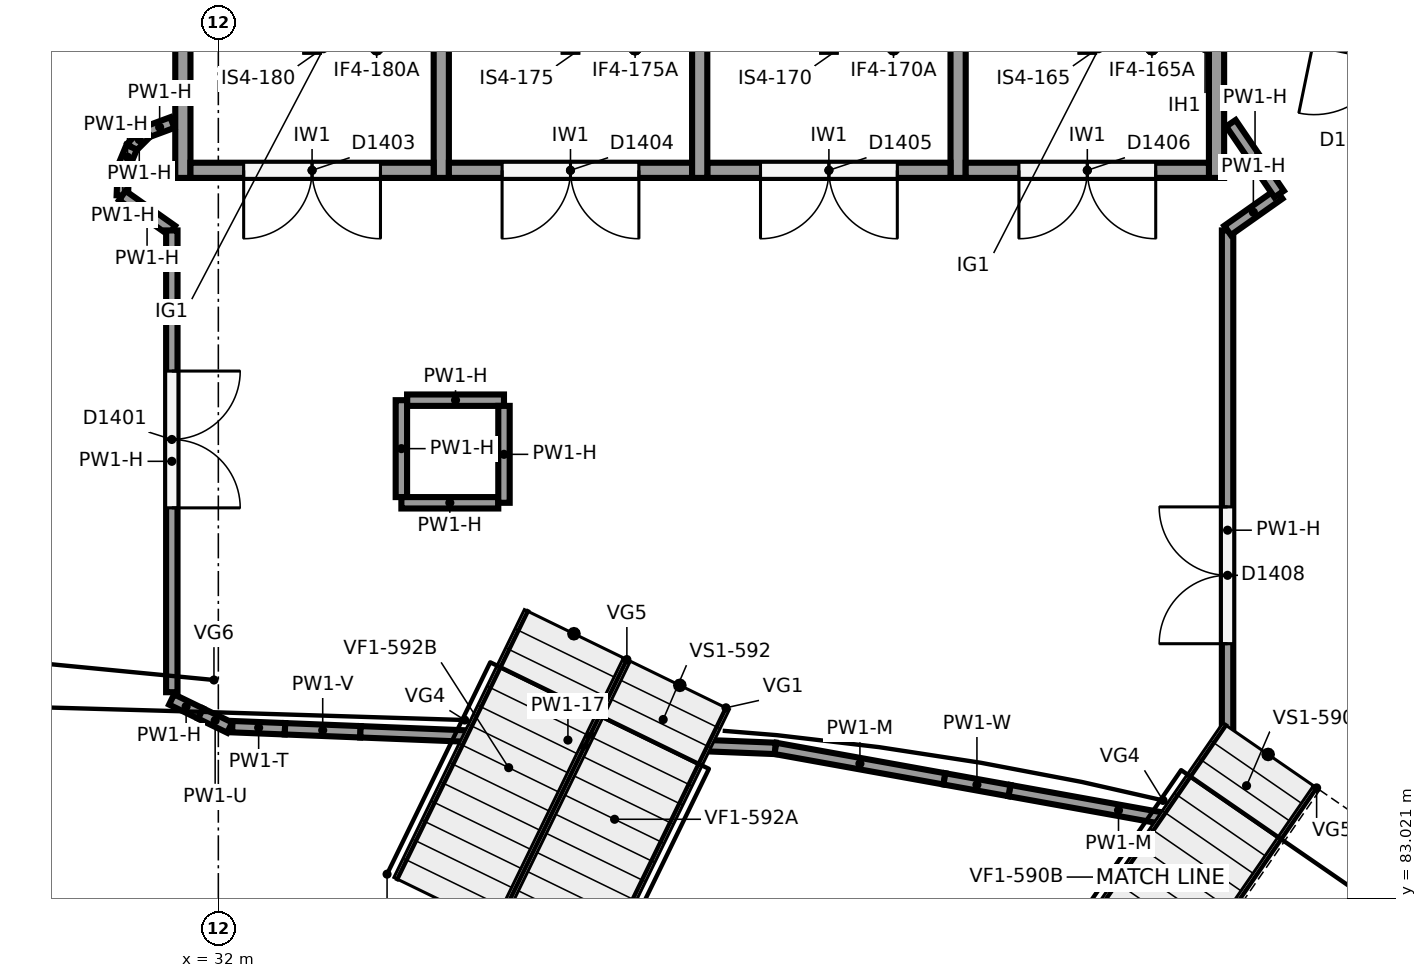
"""IFC4 building model, lengths in metres.
Left out: names, types, materials, properties, quantities, classifications, styles, units other than length and angle.
Written with IfcOpenShell. Run it as: python <this file> out.ifc"""

import sys

from ifc_helpers import new_model, si_unit, direction, frame, frame_2d, origin, origin_2d, place, context, subcontext, project, spatial, rectangle, circle, extrude, element, fill, save


model = new_model("IFC4")
c1 = context("Model", 3, precision=1e-05, world=origin(), true_north=direction((0.0, 1.0)))
c2 = subcontext(c1, "Body", "Model", "MODEL_VIEW")
j1 = project(units=[si_unit("LENGTHUNIT", "METRE"), si_unit("PLANEANGLEUNIT", "RADIAN")], contexts=[c1])
p1 = place(None, origin())
s1 = spatial("IfcSite", under=j1, at=p1, CompositionType="ELEMENT")
p2 = place(p1, origin())
s2 = spatial("IfcBuilding", under=s1, at=p2, CompositionType="ELEMENT")
p3 = place(p2, frame((0.0, 0.0, 18.0)))
s3 = spatial("IfcBuildingStorey", under=s2, at=p3, CompositionType="ELEMENT", Elevation=18.0)
p4 = place(p3, frame((42.016, 84.707, 0.0), z_axis=(0.0, 0.0, 1.0), x_axis=(1.0, 0.0, 0.0)))
e1 = element("IfcColumn", 1, at=p4, inside=s3, PredefinedType="COLUMN", context=c2, shape_type="SweptSolid", body=[
    extrude(circle(Radius=0.4, at=origin_2d()), origin(), (0.0, 0.0, 1.0), 4.807),
])
p5 = place(p3, frame((46.333, 90.126, 0.0), z_axis=(0.0, 0.0, 1.0), x_axis=(1.0, 0.0, 0.0)))
e2 = element("IfcColumn", 2, at=p5, inside=s3, PredefinedType="COLUMN", context=c2, shape_type="SweptSolid", body=[
    extrude(circle(Radius=0.45, at=origin_2d()), origin(), (0.0, 0.0, 1.0), 6.0),
])
p6 = place(p3, frame((31.737, 85.377, 0.0), z_axis=(0.0, 0.0, 1.0), x_axis=(1.0, 0.0, 0.0)))
e3 = element("IfcColumn", 3, at=p6, inside=s3, PredefinedType="COLUMN", context=c2, shape_type="SweptSolid", body=[
    extrude(circle(Radius=0.4, at=origin_2d()), origin(), (0.0, 0.0, 1.0), 4.687),
])
p7 = place(p3, frame((32.944, 90.551, 0.0), z_axis=(0.0, 0.0, 1.0), x_axis=(1.0, 0.0, 0.0)))
e4 = element("IfcColumn", 4, at=p7, inside=s3, PredefinedType="COLUMN", context=c2, shape_type="SweptSolid", body=[
    extrude(circle(Radius=0.55, at=origin_2d()), origin(), (0.0, 0.0, 1.0), 6.0),
])
for number, where, z_axis, x_axis in (
    (5, (45.133, 101.6, 0.0), (0.0, 0.0, 1.0), (0.0, -1.0, 0.0)),
    (6, (38.333, 101.6, 0.0), (0.0, 0.0, 1.0), (0.0, -1.0, 0.0)),
    (7, (31.533, 101.6, 0.0), (0.0, 0.0, 1.0), (0.0, -1.0, 0.0)),
    (8, (41.733, 101.6, 0.0), (0.0, 0.0, 1.0), (0.0, -1.0, 0.0)),
    (9, (34.933, 101.6, 0.0), (0.0, 0.0, 1.0), (0.0, -1.0, 0.0)),
):
    element("IfcWall", number, at=place(p3, frame(where, z_axis=z_axis, x_axis=x_axis)), inside=s3, PredefinedType="SHEAR", context=c2, shape_type="SweptSolid", body=[
        extrude(rectangle(XDim=9.1, YDim=0.2, at=frame_2d((4.55, 0.0))), origin(), (0.0, 0.0, 1.0), 5.6),
    ])
p8 = place(p3, frame((45.033, 92.6, 0.0), z_axis=(0.0, 0.0, 1.0), x_axis=(-1.0, 0.0, 0.0)))
e10 = element("IfcWall", 10, at=p8, inside=s3, PredefinedType="SHEAR", context=c2, shape_type="SweptSolid", body=[
    extrude(rectangle(XDim=3.2, YDim=0.2, at=frame_2d((1.6, 0.0))), origin(), (0.0, 0.0, 1.0), 5.6),
])
p9 = place(p8, frame((0.7, 0.0, 0.0)))
e11 = element("IfcOpeningElement", 11, at=p9, cuts=e10, PredefinedType="OPENING", context=c2, shape_type="SweptSolid", body=[
    extrude(rectangle(XDim=1.8, YDim=2.1, at=frame_2d((0.9, 1.05))), frame((0.0, 0.11, 0.0), z_axis=(0.0, -1.0, 0.0), x_axis=(1.0, 0.0, 0.0)), (0.0, 0.0, 1.0), 0.22),
])
p10 = place(p3, frame((41.633, 92.6, 0.0), z_axis=(0.0, 0.0, 1.0), x_axis=(-1.0, 0.0, 0.0)))
e12 = element("IfcWall", 12, at=p10, inside=s3, PredefinedType="SHEAR", context=c2, shape_type="SweptSolid", body=[
    extrude(rectangle(XDim=3.2, YDim=0.2, at=frame_2d((1.6, 0.0))), origin(), (0.0, 0.0, 1.0), 5.6),
])
p11 = place(p10, frame((0.7, 0.0, 0.0)))
e13 = element("IfcOpeningElement", 13, at=p11, cuts=e12, PredefinedType="OPENING", context=c2, shape_type="SweptSolid", body=[
    extrude(rectangle(XDim=1.8, YDim=2.1, at=frame_2d((0.9, 1.05))), frame((0.0, 0.11, 0.0), z_axis=(0.0, -1.0, 0.0), x_axis=(1.0, 0.0, 0.0)), (0.0, 0.0, 1.0), 0.22),
])
p12 = place(p3, frame((38.233, 92.6, 0.0), z_axis=(0.0, 0.0, 1.0), x_axis=(-1.0, 0.0, 0.0)))
e14 = element("IfcWall", 14, at=p12, inside=s3, PredefinedType="SHEAR", context=c2, shape_type="SweptSolid", body=[
    extrude(rectangle(XDim=3.2, YDim=0.2, at=frame_2d((1.6, 0.0))), origin(), (0.0, 0.0, 1.0), 5.6),
])
p13 = place(p12, frame((0.7, 0.0, 0.0)))
e15 = element("IfcOpeningElement", 15, at=p13, cuts=e14, PredefinedType="OPENING", context=c2, shape_type="SweptSolid", body=[
    extrude(rectangle(XDim=1.8, YDim=2.1, at=frame_2d((0.9, 1.05))), frame((0.0, 0.11, 0.0), z_axis=(0.0, -1.0, 0.0), x_axis=(1.0, 0.0, 0.0)), (0.0, 0.0, 1.0), 0.22),
])
p14 = place(p3, frame((34.833, 92.6, 0.0), z_axis=(0.0, 0.0, 1.0), x_axis=(-1.0, 0.0, 0.0)))
e16 = element("IfcWall", 16, at=p14, inside=s3, PredefinedType="SHEAR", context=c2, shape_type="SweptSolid", body=[
    extrude(rectangle(XDim=3.2, YDim=0.2, at=frame_2d((1.6, 0.0))), origin(), (0.0, 0.0, 1.0), 5.6),
])
p15 = place(p14, frame((0.7, 0.0, 0.0)))
e17 = element("IfcOpeningElement", 17, at=p15, cuts=e16, PredefinedType="OPENING", context=c2, shape_type="SweptSolid", body=[
    extrude(rectangle(XDim=1.8, YDim=2.1, at=frame_2d((0.9, 1.05))), frame((0.0, 0.11, 0.0), z_axis=(0.0, -1.0, 0.0), x_axis=(1.0, 0.0, 0.0)), (0.0, 0.0, 1.0), 0.22),
])
p16 = place(p3, frame((35.758, 89.576, 0.0), z_axis=(0.0, 0.0, 1.0), x_axis=(-1.0, 0.0, 0.0)))
e18 = element("IfcWall", 18, at=p16, inside=s3, PredefinedType="PARTITIONING", context=c2, shape_type="SweptSolid", body=[
    extrude(rectangle(XDim=1.275, YDim=0.15, at=frame_2d((0.637, 0.0))), origin(), (0.0, 0.0, 1.0), 2.844),
])
for number, where, z_axis, x_axis in (
    (19, (34.408, 89.576, 0.0), (0.0, 0.0, 1.0), (0.0, -1.0, 0.0)),
    (20, (34.408, 88.226, 0.0), (0.0, 0.0, 1.0), (1.0, 0.0, 0.0)),
    (21, (35.758, 88.226, 0.0), (0.0, 0.0, 1.0), (0.0, 1.0, 0.0)),
):
    element("IfcWall", number, at=place(p3, frame(where, z_axis=z_axis, x_axis=x_axis)), inside=s3, PredefinedType="PARTITIONING", context=c2, shape_type="SweptSolid", body=[
        extrude(rectangle(XDim=1.275, YDim=0.15, at=frame_2d((0.638, 0.0))), origin(), (0.0, 0.0, 1.0), 2.844),
    ])
p17 = place(p3, frame((31.395, 93.229, 0.0), z_axis=(0.0, 0.0, 1.0), x_axis=(-0.937757023355, -0.347292045903, 0.0)))
e22 = element("IfcWall", 22, at=p17, inside=s3, PredefinedType="PARTITIONING", context=c2, shape_type="SweptSolid", body=[
    extrude(rectangle(XDim=0.356, YDim=0.15, at=frame_2d((0.178, 0.0))), origin(), (0.0, 0.0, 1.0), 2.844),
])
p18 = place(p3, frame((31.061, 93.105, 0.0), z_axis=(0.0, 0.0, 1.0), x_axis=(-0.707534941396, -0.706678361564, 0.0)))
e23 = element("IfcWall", 23, at=p18, inside=s3, PredefinedType="PARTITIONING", context=c2, shape_type="SweptSolid", body=[
    extrude(rectangle(XDim=0.285, YDim=0.15, at=frame_2d((0.143, 0.0))), origin(), (0.0, 0.0, 1.0), 2.844),
])
p19 = place(p3, frame((30.859, 92.904, 0.0), z_axis=(0.0, 0.0, 1.0), x_axis=(-0.382275228123, -0.924048510611, 0.0)))
e24 = element("IfcWall", 24, at=p19, inside=s3, PredefinedType="PARTITIONING", context=c2, shape_type="SweptSolid", body=[
    extrude(rectangle(XDim=0.282, YDim=0.15, at=frame_2d((0.141, 0.0))), origin(), (0.0, 0.0, 1.0), 2.844),
])
p20 = place(p3, frame((30.751, 92.643, 0.0), z_axis=(0.0, 0.0, 1.0), x_axis=(-0.039058121451, -0.999236940444, 0.0)))
e25 = element("IfcWall", 25, at=p20, inside=s3, PredefinedType="PARTITIONING", context=c2, shape_type="SweptSolid", body=[
    extrude(rectangle(XDim=0.375, YDim=0.15, at=frame_2d((0.188, 0.0))), origin(), (0.0, 0.0, 1.0), 2.844),
])
p21 = place(p3, frame((30.737, 92.269, 0.0), z_axis=(0.0, 0.0, 1.0), x_axis=(0.817400495506, -0.576069813431, 0.0)))
e26 = element("IfcWall", 26, at=p21, inside=s3, PredefinedType="PARTITIONING", context=c2, shape_type="SweptSolid", body=[
    extrude(rectangle(XDim=0.797, YDim=0.15, at=frame_2d((0.398, 0.0))), origin(), (0.0, 0.0, 1.0), 2.844),
])
p22 = place(p3, frame((31.388, 91.809, 0.0), z_axis=(0.0, 0.0, 1.0), x_axis=(-8.037293e-05, -0.99999999677, 0.0)))
e27 = element("IfcWall", 27, at=p22, inside=s3, PredefinedType="PARTITIONING", context=c2, shape_type="SweptSolid", body=[
    extrude(rectangle(XDim=6.075, YDim=0.15, at=frame_2d((3.038, 0.0))), origin(), (0.0, 0.0, 1.0), 2.844),
])
p23 = place(p22, frame((1.85, 0.0, 0.0)))
e28 = element("IfcOpeningElement", 28, at=p23, cuts=e27, PredefinedType="OPENING", context=c2, shape_type="SweptSolid", body=[
    extrude(rectangle(XDim=1.8, YDim=2.1, at=frame_2d((0.9, 1.05))), frame((0.0, 0.085, 0.0), z_axis=(0.0, -1.0, 0.0), x_axis=(1.0, 0.0, 0.0)), (0.0, 0.0, 1.0), 0.17),
])
p24 = place(p3, frame((32.184, 85.281, 0.0), z_axis=(0.0, 0.0, 1.0), x_axis=(0.999194762281, -0.040122649842, 0.0)))
e29 = element("IfcWall", 29, at=p24, inside=s3, PredefinedType="PARTITIONING", context=c2, shape_type="SweptSolid", body=[
    extrude(rectangle(XDim=0.694, YDim=0.15, at=frame_2d((0.347, 0.0))), origin(), (0.0, 0.0, 1.0), 2.257),
])
p25 = place(p3, frame((32.877, 85.253, 0.0), z_axis=(0.0, 0.0, 1.0), x_axis=(0.999197421749, -0.040056364915, 0.0)))
e30 = element("IfcWall", 30, at=p25, inside=s3, PredefinedType="PARTITIONING", context=c2, shape_type="SweptSolid", body=[
    extrude(rectangle(XDim=0.993, YDim=0.15, at=frame_2d((0.497, 0.0))), origin(), (0.0, 0.0, 1.0), 2.506),
])
p26 = place(p3, frame((33.87, 85.213, 0.0), z_axis=(0.0, 0.0, 1.0), x_axis=(0.999200173436, -0.039987665678, 0.0)))
e31 = element("IfcWall", 31, at=p26, inside=s3, PredefinedType="PARTITIONING", context=c2, shape_type="SweptSolid", body=[
    extrude(rectangle(XDim=5.464, YDim=0.15, at=frame_2d((2.732, 0.0))), origin(), (0.0, 0.0, 1.0), 2.756),
])
p27 = place(p3, frame((39.33, 84.995, 0.0), z_axis=(0.0, 0.0, 1.0), x_axis=(0.984135059847, -0.177420923174, 0.0)))
e32 = element("IfcWall", 32, at=p27, inside=s3, PredefinedType="PARTITIONING", context=c2, shape_type="SweptSolid", body=[
    extrude(rectangle(XDim=2.26, YDim=0.15, at=frame_2d((1.13, 0.0))), origin(), (0.0, 0.0, 1.0), 2.581),
])
p28 = place(p3, frame((42.409, 84.44, 0.0), z_axis=(0.0, 0.0, 1.0), x_axis=(0.984120784208, -0.177500090396, 0.0)))
e33 = element("IfcWall", 33, at=p28, inside=s3, PredefinedType="PARTITIONING", context=c2, shape_type="SweptSolid", body=[
    extrude(rectangle(XDim=2.916, YDim=0.15, at=frame_2d((1.458, 0.0))), origin(), (0.0, 0.0, 1.0), 2.581),
])
p29 = place(p3, frame((45.278, 83.922, 0.0), z_axis=(0.0, 0.0, 1.0), x_axis=(6.1908005e-05, 0.999999998084, 0.0)))
e34 = element("IfcWall", 34, at=p29, inside=s3, PredefinedType="PARTITIONING", context=c2, shape_type="SweptSolid", body=[
    extrude(rectangle(XDim=7.887, YDim=0.15, at=frame_2d((3.944, 0.0))), origin(), (0.0, 0.0, 1.0), 2.844),
])
p30 = place(p29, frame((2.45, 0.0, 0.0)))
e35 = element("IfcOpeningElement", 35, at=p30, cuts=e34, PredefinedType="OPENING", context=c2, shape_type="SweptSolid", body=[
    extrude(rectangle(XDim=1.8, YDim=2.1, at=frame_2d((0.9, 1.05))), frame((0.0, 0.085, 0.0), z_axis=(0.0, -1.0, 0.0), x_axis=(1.0, 0.0, 0.0)), (0.0, 0.0, 1.0), 0.17),
])
p31 = place(p3, frame((45.279, 91.809, 0.0), z_axis=(0.0, 0.0, 1.0), x_axis=(0.817057482717, 0.576556215764, 0.0)))
e36 = element("IfcWall", 36, at=p31, inside=s3, PredefinedType="PARTITIONING", context=c2, shape_type="SweptSolid", body=[
    extrude(rectangle(XDim=0.83, YDim=0.15, at=frame_2d((0.415, 0.0))), origin(), (0.0, 0.0, 1.0), 2.844),
])
p32 = place(p3, frame((45.957, 92.288, 0.0), z_axis=(0.0, 0.0, 1.0), x_axis=(-0.562920067311, 0.826511341615, 0.0)))
e37 = element("IfcWall", 37, at=p32, inside=s3, PredefinedType="PARTITIONING", context=c2, shape_type="SweptSolid", body=[
    extrude(rectangle(XDim=1.127, YDim=0.15, at=frame_2d((0.563, 0.0))), origin(), (0.0, 0.0, 1.0), 2.844),
])
p33 = place(p3, frame((31.385, 85.638, 0.0), z_axis=(0.0, 0.0, 1.0), x_axis=(0.900217444271, -0.435440642373, 0.0)))
e38 = element("IfcWall", 38, at=p33, inside=s3, PredefinedType="PARTITIONING", context=c2, shape_type="SweptSolid", body=[
    extrude(rectangle(XDim=0.424, YDim=0.15, at=frame_2d((0.212, 0.0))), origin(), (0.0, 0.0, 1.0), 2.844),
])
p34 = place(p3, frame((31.767, 85.454, 0.0), z_axis=(0.0, 0.0, 1.0), x_axis=(0.899991899384, -0.435906619638, 0.0)))
e39 = element("IfcWall", 39, at=p34, inside=s3, PredefinedType="PARTITIONING", context=c2, shape_type="SweptSolid", body=[
    extrude(rectangle(XDim=0.425, YDim=0.15, at=frame_2d((0.212, 0.0))), origin(), (0.0, 0.0, 1.0), 2.316),
])
p35 = place(p3, frame((41.553, 84.594, 0.0), z_axis=(0.0, 0.0, 1.0), x_axis=(0.984120583858, -0.177501201198, 0.0)))
e40 = element("IfcWall", 40, at=p35, inside=s3, PredefinedType="PARTITIONING", context=c2, shape_type="SweptSolid", body=[
    extrude(rectangle(XDim=0.869, YDim=0.15, at=frame_2d((0.435, 0.0))), origin(), (0.0, 0.0, 1.0), 2.556),
])
p36 = place(p3, frame((47.593, 94.091, 0.0), z_axis=(0.0, 0.0, 1.0), x_axis=(-0.979465147649, 0.201613552472, 0.0)))
e41 = element("IfcWall", 41, at=p36, inside=s3, PredefinedType="PARTITIONING", context=c2, shape_type="SweptSolid", body=[
    extrude(rectangle(XDim=1.4, YDim=0.15, at=frame_2d((0.7, 0.0))), origin(), (0.0, 0.0, 1.0), 5.6),
])
p37 = place(p36, frame((0.2, 0.0, 0.0)))
e42 = element("IfcOpeningElement", 42, at=p37, cuts=e41, PredefinedType="OPENING", context=c2, shape_type="SweptSolid", body=[
    extrude(rectangle(XDim=1.0, YDim=2.1, at=frame_2d((0.5, 1.05))), frame((0.0, 0.085, 0.0), z_axis=(0.0, -1.0, 0.0), x_axis=(1.0, 0.0, 0.0)), (0.0, 0.0, 1.0), 0.17),
])
p38 = place(p9, origin())
e43 = element("IfcDoor", 43, at=p38, inside=s3, OperationType="DOUBLE_DOOR_SINGLE_SWING", PredefinedType="DOOR", context=c2, shape_type="SweptSolid", body=[
    extrude(rectangle(XDim=1.8, YDim=2.1, at=frame_2d((0.9, 1.05))), frame((0.0, 0.025, 0.0), z_axis=(0.0, -1.0, 0.0), x_axis=(1.0, 0.0, 0.0)), (0.0, 0.0, 1.0), 0.05),
])
fill(e11, e43)
p39 = place(p11, origin())
e44 = element("IfcDoor", 44, at=p39, inside=s3, OperationType="DOUBLE_DOOR_SINGLE_SWING", PredefinedType="DOOR", context=c2, shape_type="SweptSolid", body=[
    extrude(rectangle(XDim=1.8, YDim=2.1, at=frame_2d((0.9, 1.05))), frame((0.0, 0.025, 0.0), z_axis=(0.0, -1.0, 0.0), x_axis=(1.0, 0.0, 0.0)), (0.0, 0.0, 1.0), 0.05),
])
fill(e13, e44)
p40 = place(p13, origin())
e45 = element("IfcDoor", 45, at=p40, inside=s3, OperationType="DOUBLE_DOOR_SINGLE_SWING", PredefinedType="DOOR", context=c2, shape_type="SweptSolid", body=[
    extrude(rectangle(XDim=1.8, YDim=2.1, at=frame_2d((0.9, 1.05))), frame((0.0, 0.025, 0.0), z_axis=(0.0, -1.0, 0.0), x_axis=(1.0, 0.0, 0.0)), (0.0, 0.0, 1.0), 0.05),
])
fill(e15, e45)
p41 = place(p15, origin())
e46 = element("IfcDoor", 46, at=p41, inside=s3, OperationType="DOUBLE_DOOR_SINGLE_SWING", PredefinedType="DOOR", context=c2, shape_type="SweptSolid", body=[
    extrude(rectangle(XDim=1.8, YDim=2.1, at=frame_2d((0.9, 1.05))), frame((0.0, 0.025, 0.0), z_axis=(0.0, -1.0, 0.0), x_axis=(1.0, 0.0, 0.0)), (0.0, 0.0, 1.0), 0.05),
])
fill(e17, e46)
p42 = place(p30, origin())
e47 = element("IfcDoor", 47, at=p42, inside=s3, OperationType="DOUBLE_DOOR_SINGLE_SWING", PredefinedType="DOOR", context=c2, shape_type="SweptSolid", body=[
    extrude(rectangle(XDim=1.8, YDim=2.1, at=frame_2d((0.9, 1.05))), frame((0.0, 0.025, 0.0), z_axis=(0.0, -1.0, 0.0), x_axis=(1.0, 0.0, 0.0)), (0.0, 0.0, 1.0), 0.05),
])
fill(e35, e47)
p43 = place(p23, origin())
e48 = element("IfcDoor", 48, at=p43, inside=s3, OperationType="DOUBLE_DOOR_SINGLE_SWING", PredefinedType="DOOR", context=c2, shape_type="SweptSolid", body=[
    extrude(rectangle(XDim=1.8, YDim=2.1, at=frame_2d((0.9, 1.05))), frame((0.0, 0.025, 0.0), z_axis=(0.0, -1.0, 0.0), x_axis=(1.0, 0.0, 0.0)), (0.0, 0.0, 1.0), 0.05),
])
fill(e28, e48)
p44 = place(p37, origin())
e49 = element("IfcDoor", 49, at=p44, inside=s3, OperationType="SINGLE_SWING_RIGHT", PredefinedType="DOOR", context=c2, shape_type="SweptSolid", body=[
    extrude(rectangle(XDim=1.0, YDim=2.1, at=frame_2d((0.5, 1.05))), frame((0.0, 0.025, 0.0), z_axis=(0.0, -1.0, 0.0), x_axis=(1.0, 0.0, 0.0)), (0.0, 0.0, 1.0), 0.05),
])
fill(e42, e49)
save(model, sys.argv[1])
